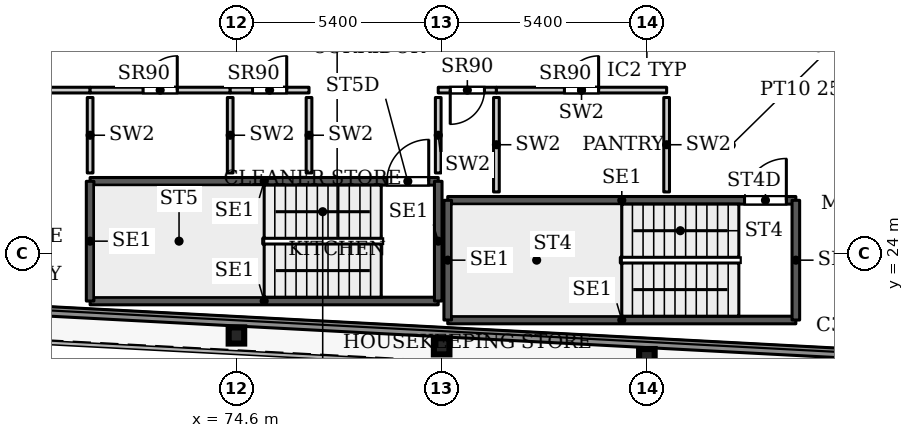
"""IFC4 building model, lengths in metres.
Left out: names, types, materials, properties, quantities, classifications, styles, units other than length and angle.
Written with IfcOpenShell. Run it as: python <this file> out.ifc"""

import sys

from ifc_helpers import new_model, si_unit, direction, frame, frame_2d, origin, origin_2d, place, context, subcontext, project, spatial, rectangle, i_section, extrude, source, transform, mapped, element, fill, save


model = new_model("IFC4")
c1 = context("Model", 3, precision=1e-05, world=origin(), true_north=direction((0.0, 1.0)))
c2 = subcontext(c1, "Body", "Model", "MODEL_VIEW")
j1 = project(units=[si_unit("LENGTHUNIT", "METRE"), si_unit("PLANEANGLEUNIT", "RADIAN")], contexts=[c1])
p1 = place(None, origin())
s1 = spatial("IfcSite", under=j1, at=p1, CompositionType="ELEMENT")
p2 = place(p1, origin())
s2 = spatial("IfcBuilding", under=s1, at=p2, CompositionType="ELEMENT")
p3 = place(p2, frame((0.0, 0.0, 172.1)))
s3 = spatial("IfcBuildingStorey", under=s2, at=p3, CompositionType="ELEMENT", Elevation=172.1)
for number, where, z_axis, x_axis in (
    (1, (85.4, 21.274, 0.0), (0.0, 0.0, 1.0), (1.0, 0.0, 0.0)),
    (2, (80.0, 21.558, 0.0), (0.0, 0.0, 1.0), (1.0, 0.0, 0.0)),
    (3, (74.6, 21.843, 0.0), (0.0, 0.0, 1.0), (1.0, 0.0, 0.0)),
):
    element("IfcColumn", number, at=place(p3, frame(where, z_axis=z_axis, x_axis=x_axis)), inside=s3, PredefinedType="COLUMN", context=c2, shape_type="SweptSolid", body=[
        extrude(i_section(OverallWidth=0.409, OverallDepth=0.425, WebThickness=0.033, FlangeThickness=0.052, FilletRadius=0.013, at=origin_2d()), origin(), (0.0, 0.0, 1.0), 3.9),
    ])
p4 = place(p3, frame((95.186, 21.134, 0.0), z_axis=(0.0, 0.0, 1.0), x_axis=(-0.998617201448, 0.052570761569, 0.0)))
e4 = element("IfcWall", 4, at=p4, inside=s3, PredefinedType="SOLIDWALL", context=c2, shape_type="SweptSolid", body=[
    extrude(rectangle(XDim=61.232, YDim=0.25, at=frame_2d((30.616, 0.0))), origin(), (0.0, 0.0, 1.0), 3.75),
])
p5 = place(p3, frame((80.16, 22.25, 0.0), z_axis=(0.0, 0.0, 1.0), x_axis=(1.0, 0.0, 0.0)))
e5 = element("IfcWall", 5, at=p5, inside=s3, PredefinedType="SHEAR", context=c2, shape_type="SweptSolid", body=[
    extrude(rectangle(XDim=9.16, YDim=0.2, at=frame_2d((4.58, 0.0))), origin(), (0.0, 0.0, 1.0), 3.9),
])
p6 = place(p3, frame((80.16, 25.4, 0.0), z_axis=(0.0, 0.0, 1.0), x_axis=(1.0, 0.0, 0.0)))
e6 = element("IfcWall", 6, at=p6, inside=s3, PredefinedType="SHEAR", context=c2, shape_type="SweptSolid", body=[
    extrude(rectangle(XDim=9.16, YDim=0.2, at=frame_2d((4.58, 0.0))), origin(), (0.0, 0.0, 1.0), 3.9),
])
p7 = place(p6, frame((7.81, 0.0, 0.0)))
e7 = element("IfcOpeningElement", 7, at=p7, cuts=e6, PredefinedType="OPENING", context=c2, shape_type="SweptSolid", body=[
    extrude(rectangle(XDim=1.1, YDim=2.2, at=frame_2d((0.55, 1.1))), frame((0.0, 0.11, 0.0), z_axis=(0.0, -1.0, 0.0), x_axis=(1.0, 0.0, 0.0)), (0.0, 0.0, 1.0), 0.22),
])
for number, where, z_axis, x_axis in (
    (8, (80.16, 22.25, 0.0), (0.0, 0.0, 1.0), (0.0, 1.0, 0.0)),
    (9, (89.32, 22.25, 0.0), (0.0, 0.0, 1.0), (0.0, 1.0, 0.0)),
):
    element("IfcWall", number, at=place(p3, frame(where, z_axis=z_axis, x_axis=x_axis)), inside=s3, PredefinedType="SHEAR", context=c2, shape_type="SweptSolid", body=[
        extrude(rectangle(XDim=3.15, YDim=0.2, at=frame_2d((1.575, 0.0))), origin(), (0.0, 0.0, 1.0), 3.9),
    ])
p8 = place(p3, frame((70.75, 22.75, 0.0), z_axis=(0.0, 0.0, 1.0), x_axis=(1.0, 0.0, 0.0)))
e10 = element("IfcWall", 10, at=p8, inside=s3, PredefinedType="SHEAR", context=c2, shape_type="SweptSolid", body=[
    extrude(rectangle(XDim=9.16, YDim=0.2, at=frame_2d((4.58, 0.0))), origin(), (0.0, 0.0, 1.0), 3.9),
])
p9 = place(p3, frame((70.75, 25.9, 0.0), z_axis=(0.0, 0.0, 1.0), x_axis=(1.0, 0.0, 0.0)))
e11 = element("IfcWall", 11, at=p9, inside=s3, PredefinedType="SHEAR", context=c2, shape_type="SweptSolid", body=[
    extrude(rectangle(XDim=9.16, YDim=0.2, at=frame_2d((4.58, 0.0))), origin(), (0.0, 0.0, 1.0), 3.9),
])
p10 = place(p9, frame((7.81, 0.0, 0.0)))
e12 = element("IfcOpeningElement", 12, at=p10, cuts=e11, PredefinedType="OPENING", context=c2, shape_type="SweptSolid", body=[
    extrude(rectangle(XDim=1.1, YDim=2.2, at=frame_2d((0.55, 1.1))), frame((0.0, 0.11, 0.0), z_axis=(0.0, -1.0, 0.0), x_axis=(1.0, 0.0, 0.0)), (0.0, 0.0, 1.0), 0.22),
])
for number, where, z_axis, x_axis in (
    (13, (70.75, 22.75, 0.0), (0.0, 0.0, 1.0), (0.0, 1.0, 0.0)),
    (14, (79.91, 22.75, 0.0), (0.0, 0.0, 1.0), (0.0, 1.0, 0.0)),
):
    element("IfcWall", number, at=place(p3, frame(where, z_axis=z_axis, x_axis=x_axis)), inside=s3, PredefinedType="SHEAR", context=c2, shape_type="SweptSolid", body=[
        extrude(rectangle(XDim=3.15, YDim=0.2, at=frame_2d((1.575, 0.0))), origin(), (0.0, 0.0, 1.0), 3.9),
    ])
p11 = place(p3, frame((62.819, 28.3, 0.0), z_axis=(0.0, 0.0, 1.0), x_axis=(1.0, 0.0, 0.0)))
e15 = element("IfcWall", 15, at=p11, inside=s3, PredefinedType="PARTITIONING", context=c2, shape_type="SweptSolid", body=[
    extrude(rectangle(XDim=7.931, YDim=0.15, at=frame_2d((3.965, 0.0))), origin(), (0.0, 0.0, 1.0), 3.072),
])
p12 = place(p11, frame((3.515, 0.0, 0.0)))
e16 = element("IfcOpeningElement", 16, at=p12, cuts=e15, PredefinedType="OPENING", context=c2, shape_type="SweptSolid", body=[
    extrude(rectangle(XDim=0.9, YDim=2.2, at=frame_2d((0.45, 1.1))), frame((0.0, 0.085, 0.0), z_axis=(0.0, -1.0, 0.0), x_axis=(1.0, 0.0, 0.0)), (0.0, 0.0, 1.0), 0.17),
])
p13 = place(p3, frame((70.75, 26.12, 0.0), z_axis=(0.0, 0.0, 1.0), x_axis=(0.0, 1.0, 0.0)))
e17 = element("IfcWall", 17, at=p13, inside=s3, PredefinedType="PARTITIONING", context=c2, shape_type="SweptSolid", body=[
    extrude(rectangle(XDim=1.985, YDim=0.15, at=frame_2d((0.992, 0.0))), origin(), (0.0, 0.0, 1.0), 3.9),
])
p14 = place(p3, frame((70.75, 28.3, 0.0), z_axis=(0.0, 0.0, 1.0), x_axis=(1.0, 0.0, 0.0)))
e18 = element("IfcWall", 18, at=p14, inside=s3, PredefinedType="PARTITIONING", context=c2, shape_type="SweptSolid", body=[
    extrude(rectangle(XDim=3.686, YDim=0.15, at=frame_2d((1.843, 0.0))), origin(), (0.0, 0.0, 1.0), 3.9),
])
p15 = place(p14, frame((1.393, 0.0, 0.0)))
e19 = element("IfcOpeningElement", 19, at=p15, cuts=e18, PredefinedType="OPENING", context=c2, shape_type="SweptSolid", body=[
    extrude(rectangle(XDim=0.9, YDim=2.2, at=frame_2d((0.45, 1.1))), frame((0.0, 0.085, 0.0), z_axis=(0.0, -1.0, 0.0), x_axis=(1.0, 0.0, 0.0)), (0.0, 0.0, 1.0), 0.17),
])
p16 = place(p3, frame((74.436, 26.12, 0.0), z_axis=(0.0, 0.0, 1.0), x_axis=(0.0, 1.0, 0.0)))
e20 = element("IfcWall", 20, at=p16, inside=s3, PredefinedType="PARTITIONING", context=c2, shape_type="SweptSolid", body=[
    extrude(rectangle(XDim=1.985, YDim=0.15, at=frame_2d((0.992, 0.0))), origin(), (0.0, 0.0, 1.0), 3.9),
])
p17 = place(p3, frame((74.436, 28.3, 0.0), z_axis=(0.0, 0.0, 1.0), x_axis=(1.0, 0.0, 0.0)))
e21 = element("IfcWall", 21, at=p17, inside=s3, PredefinedType="PARTITIONING", context=c2, shape_type="SweptSolid", body=[
    extrude(rectangle(XDim=2.074, YDim=0.15, at=frame_2d((1.037, 0.0))), origin(), (0.0, 0.0, 1.0), 3.9),
])
p18 = place(p17, frame((0.587, 0.0, 0.0)))
e22 = element("IfcOpeningElement", 22, at=p18, cuts=e21, PredefinedType="OPENING", context=c2, shape_type="SweptSolid", body=[
    extrude(rectangle(XDim=0.9, YDim=2.2, at=frame_2d((0.45, 1.1))), frame((0.0, 0.085, 0.0), z_axis=(0.0, -1.0, 0.0), x_axis=(1.0, 0.0, 0.0)), (0.0, 0.0, 1.0), 0.17),
])
p19 = place(p3, frame((76.51, 26.12, 0.0), z_axis=(0.0, 0.0, 1.0), x_axis=(0.0, 1.0, 0.0)))
e23 = element("IfcWall", 23, at=p19, inside=s3, PredefinedType="PARTITIONING", context=c2, shape_type="SweptSolid", body=[
    extrude(rectangle(XDim=1.985, YDim=0.15, at=frame_2d((0.992, 0.0))), origin(), (0.0, 0.0, 1.0), 3.9),
])
p20 = place(p3, frame((79.91, 28.3, 0.0), z_axis=(0.0, 0.0, 1.0), x_axis=(1.0, 0.0, 0.0)))
e24 = element("IfcWall", 24, at=p20, inside=s3, PredefinedType="PARTITIONING", context=c2, shape_type="SweptSolid", body=[
    extrude(rectangle(XDim=1.531, YDim=0.15, at=frame_2d((0.766, 0.0))), origin(), (0.0, 0.0, 1.0), 3.9),
])
p21 = place(p20, frame((0.316, 0.0, 0.0)))
e25 = element("IfcOpeningElement", 25, at=p21, cuts=e24, PredefinedType="OPENING", context=c2, shape_type="SweptSolid", body=[
    extrude(rectangle(XDim=0.9, YDim=2.2, at=frame_2d((0.45, 1.1))), frame((0.0, 0.085, 0.0), z_axis=(0.0, -1.0, 0.0), x_axis=(1.0, 0.0, 0.0)), (0.0, 0.0, 1.0), 0.17),
])
p22 = place(p3, frame((79.91, 26.12, 0.0), z_axis=(0.0, 0.0, 1.0), x_axis=(0.0, 1.0, 0.0)))
e26 = element("IfcWall", 26, at=p22, inside=s3, PredefinedType="PARTITIONING", context=c2, shape_type="SweptSolid", body=[
    extrude(rectangle(XDim=1.985, YDim=0.15, at=frame_2d((0.992, 0.0))), origin(), (0.0, 0.0, 1.0), 3.9),
])
p23 = place(p3, frame((81.441, 25.62, 0.0), z_axis=(0.0, 0.0, 1.0), x_axis=(0.0, 1.0, 0.0)))
e27 = element("IfcWall", 27, at=p23, inside=s3, PredefinedType="PARTITIONING", context=c2, shape_type="SweptSolid", body=[
    extrude(rectangle(XDim=2.485, YDim=0.15, at=frame_2d((1.242, 0.0))), origin(), (0.0, 0.0, 1.0), 3.9),
])
p24 = place(p3, frame((81.441, 28.3, 0.0), z_axis=(0.0, 0.0, 1.0), x_axis=(1.0, 0.0, 0.0)))
e28 = element("IfcWall", 28, at=p24, inside=s3, PredefinedType="PARTITIONING", context=c2, shape_type="SweptSolid", body=[
    extrude(rectangle(XDim=4.479, YDim=0.15, at=frame_2d((2.24, 0.0))), origin(), (0.0, 0.0, 1.0), 3.9),
])
p25 = place(p24, frame((1.789, 0.0, 0.0)))
e29 = element("IfcOpeningElement", 29, at=p25, cuts=e28, PredefinedType="OPENING", context=c2, shape_type="SweptSolid", body=[
    extrude(rectangle(XDim=0.9, YDim=2.2, at=frame_2d((0.45, 1.1))), frame((0.0, 0.085, 0.0), z_axis=(0.0, -1.0, 0.0), x_axis=(1.0, 0.0, 0.0)), (0.0, 0.0, 1.0), 0.17),
])
p26 = place(p3, frame((85.92, 25.62, 0.0), z_axis=(0.0, 0.0, 1.0), x_axis=(0.0, 1.0, 0.0)))
e30 = element("IfcWall", 30, at=p26, inside=s3, PredefinedType="PARTITIONING", context=c2, shape_type="SweptSolid", body=[
    extrude(rectangle(XDim=2.485, YDim=0.15, at=frame_2d((1.242, 0.0))), origin(), (0.0, 0.0, 1.0), 3.9),
])
m1 = source(origin(), c2, "Body", "SweptSolid", [
    extrude(rectangle(XDim=0.9, YDim=2.2, at=frame_2d((0.45, 1.1))), frame((0.0, 0.025, 0.0), z_axis=(0.0, -1.0, 0.0), x_axis=(1.0, 0.0, 0.0)), (0.0, 0.0, 1.0), 0.05),
])
p27 = place(p15, origin())
e31 = element("IfcDoor", 31, at=p27, inside=s3, OperationType="SINGLE_SWING_LEFT", PredefinedType="DOOR", context=c2, shape_type="MappedRepresentation", body=[
    mapped(m1, transform((0.0, 0.0, 0.0), x_axis=(1.0, 0.0, 0.0), y_axis=(0.0, 1.0, 0.0), z_axis=(0.0, 0.0, 1.0), scale=1.0)),
])
fill(e19, e31)
p28 = place(p18, origin())
e32 = element("IfcDoor", 32, at=p28, inside=s3, OperationType="SINGLE_SWING_LEFT", PredefinedType="DOOR", context=c2, shape_type="MappedRepresentation", body=[
    mapped(m1, transform((0.0, 0.0, 0.0), x_axis=(1.0, 0.0, 0.0), y_axis=(0.0, 1.0, 0.0), z_axis=(0.0, 0.0, 1.0), scale=1.0)),
])
fill(e22, e32)
p29 = place(p21, origin())
e33 = element("IfcDoor", 33, at=p29, inside=s3, OperationType="SINGLE_SWING_RIGHT", PredefinedType="DOOR", context=c2, shape_type="MappedRepresentation", body=[
    mapped(m1, transform((0.0, 0.0, 0.0), x_axis=(1.0, 0.0, 0.0), y_axis=(0.0, 1.0, 0.0), z_axis=(0.0, 0.0, 1.0), scale=1.0)),
])
fill(e25, e33)
p30 = place(p25, origin())
e34 = element("IfcDoor", 34, at=p30, inside=s3, OperationType="SINGLE_SWING_LEFT", PredefinedType="DOOR", context=c2, shape_type="MappedRepresentation", body=[
    mapped(m1, transform((0.0, 0.0, 0.0), x_axis=(1.0, 0.0, 0.0), y_axis=(0.0, 1.0, 0.0), z_axis=(0.0, 0.0, 1.0), scale=1.0)),
])
fill(e29, e34)
m2 = source(origin(), c2, "Body", "SweptSolid", [
    extrude(rectangle(XDim=1.1, YDim=2.2, at=frame_2d((0.55, 1.1))), frame((0.0, 0.025, 0.0), z_axis=(0.0, -1.0, 0.0), x_axis=(1.0, 0.0, 0.0)), (0.0, 0.0, 1.0), 0.05),
])
p31 = place(p7, origin())
e35 = element("IfcDoor", 35, at=p31, inside=s3, OperationType="SINGLE_SWING_LEFT", PredefinedType="DOOR", context=c2, shape_type="MappedRepresentation", body=[
    mapped(m2, transform((0.0, 0.0, 0.0), x_axis=(1.0, 0.0, 0.0), y_axis=(0.0, 1.0, 0.0), z_axis=(0.0, 0.0, 1.0), scale=1.0)),
])
fill(e7, e35)
p32 = place(p10, origin())
e36 = element("IfcDoor", 36, at=p32, inside=s3, OperationType="SINGLE_SWING_LEFT", PredefinedType="DOOR", context=c2, shape_type="MappedRepresentation", body=[
    mapped(m2, transform((0.0, 0.0, 0.0), x_axis=(1.0, 0.0, 0.0), y_axis=(0.0, 1.0, 0.0), z_axis=(0.0, 0.0, 1.0), scale=1.0)),
])
fill(e12, e36)
save(model, sys.argv[1])
